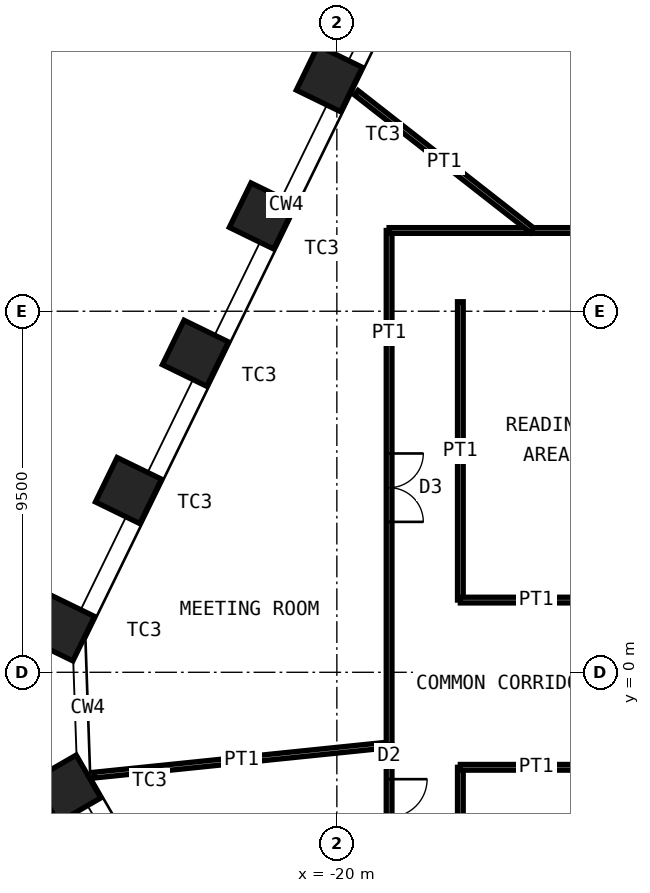
"""IFC4 building model, lengths in metres.
Left out: names, types, materials, properties, quantities, classifications, styles, units other than length and angle.
Written with IfcOpenShell. Run it as: python <this file> out.ifc"""

import sys

from ifc_helpers import new_model, si_unit, direction, frame, frame_2d, origin, origin_2d, place, context, subcontext, project, spatial, rectangle, hollow_rectangle, extrude, element, fill, save


model = new_model("IFC4")
c1 = context("Model", 3, precision=1e-05, world=origin(), true_north=direction((0.0, 1.0)))
c2 = subcontext(c1, "Body", "Model", "MODEL_VIEW")
j1 = project(units=[si_unit("LENGTHUNIT", "METRE"), si_unit("PLANEANGLEUNIT", "RADIAN")], contexts=[c1])
p1 = place(None, origin())
s1 = spatial("IfcSite", under=j1, at=p1, CompositionType="ELEMENT")
p2 = place(p1, origin())
s2 = spatial("IfcBuilding", under=s1, at=p2, CompositionType="ELEMENT")
p3 = place(p2, frame((0.0, 0.0, 115.6)))
s3 = spatial("IfcBuildingStorey", under=s2, at=p3, CompositionType="ELEMENT", Elevation=115.6)
for number, where, z_axis, x_axis in (
    (1, (-27.097, -3.067, 0.0), (0.0, 0.0, 1.0), (0.5, -0.866, 0.0)),
    (2, (-27.245, 1.169, 0.0), (0.0, 0.0, 1.0), (-0.438, -0.899, 0.0)),
    (3, (-25.483, 4.781, 0.0), (0.0, 0.0, 1.0), (-0.438, -0.899, 0.0)),
    (4, (-23.721, 8.394, 0.0), (0.0, 0.0, 1.0), (-0.438, -0.899, 0.0)),
    (5, (-21.959, 12.006, 0.0), (0.0, 0.0, 1.0), (-0.438, -0.899, 0.0)),
    (6, (-20.198, 15.618, 0.0), (0.0, 0.0, 1.0), (-0.438, -0.899, 0.0)),
):
    element("IfcColumn", number, at=place(p3, frame(where, z_axis=z_axis, x_axis=x_axis)), inside=s3, PredefinedType="COLUMN", context=c2, shape_type="SweptSolid", body=[
        extrude(hollow_rectangle(XDim=1.3, YDim=1.3, WallThickness=0.1, at=origin_2d()), origin(), (0.0, 0.0, 1.0), 4.2),
    ])
p4 = place(p3, frame((-15.987, 22.455, 0.0), z_axis=(0.0, 0.0, 1.0), x_axis=(0.579969304452, -0.814638328274, 0.0)))
e7 = element("IfcWall", 7, at=p4, inside=s3, PredefinedType="PARTITIONING", context=c2, shape_type="SweptSolid", body=[
    extrude(rectangle(XDim=13.294, YDim=0.15, at=frame_2d((6.647, 0.0))), origin(), (0.0, 0.0, 1.0), 2.93),
])
p5 = place(p3, frame((-18.625, -4.715, 0.0), z_axis=(0.0, 0.0, 1.0), x_axis=(0.0, 1.0, 0.0)))
e8 = element("IfcWall", 8, at=p5, inside=s3, PredefinedType="PARTITIONING", context=c2, shape_type="SweptSolid", body=[
    extrude(rectangle(XDim=2.805, YDim=0.15, at=frame_2d((1.402, 0.0))), origin(), (0.0, 0.0, 1.0), 4.03),
])
p6 = place(p5, frame((0.902, 0.0, 0.0)))
e9 = element("IfcOpeningElement", 9, at=p6, cuts=e8, PredefinedType="OPENING", context=c2, shape_type="SweptSolid", body=[
    extrude(rectangle(XDim=1.0, YDim=2.4, at=frame_2d((0.5, 1.2))), frame((0.0, 0.085, 0.0), z_axis=(0.0, -1.0, 0.0), x_axis=(1.0, 0.0, 0.0)), (0.0, 0.0, 1.0), 0.17),
])
p7 = place(p3, frame((-26.391, -2.706, 0.0), z_axis=(0.0, 0.0, 1.0), x_axis=(0.994783554373, 0.10200823471, 0.0)))
e10 = element("IfcWall", 10, at=p7, inside=s3, PredefinedType="PARTITIONING", context=c2, shape_type="SweptSolid", body=[
    extrude(rectangle(XDim=7.807, YDim=0.15, at=frame_2d((3.904, 0.0))), origin(), (0.0, 0.0, 1.0), 2.93),
])
p8 = place(p3, frame((-18.625, -1.91, 0.0), z_axis=(0.0, 0.0, 1.0), x_axis=(0.0, 1.0, 0.0)))
e11 = element("IfcWall", 11, at=p8, inside=s3, PredefinedType="PARTITIONING", context=c2, shape_type="SweptSolid", body=[
    extrude(rectangle(XDim=13.535, YDim=0.15, at=frame_2d((6.768, 0.0))), origin(), (0.0, 0.0, 1.0), 4.03),
])
p9 = place(p8, frame((5.867, 0.0, 0.0)))
e12 = element("IfcOpeningElement", 12, at=p9, cuts=e11, PredefinedType="OPENING", context=c2, shape_type="SweptSolid", body=[
    extrude(rectangle(XDim=1.8, YDim=2.4, at=frame_2d((0.9, 1.2))), frame((0.0, 0.085, 0.0), z_axis=(0.0, -1.0, 0.0), x_axis=(1.0, 0.0, 0.0)), (0.0, 0.0, 1.0), 0.17),
])
p10 = place(p3, frame((-18.625, 11.625, 0.0), z_axis=(0.0, 0.0, 1.0), x_axis=(1.0, 0.0, 0.0)))
e13 = element("IfcWall", 13, at=p10, inside=s3, PredefinedType="PARTITIONING", context=c2, shape_type="SweptSolid", body=[
    extrude(rectangle(XDim=3.768, YDim=0.15, at=frame_2d((1.884, 0.0))), origin(), (0.0, 0.0, 1.0), 4.03),
])
p11 = place(p3, frame((-19.49, 15.25, 0.0), z_axis=(0.0, 0.0, 1.0), x_axis=(0.787549668605, -0.616251182133, 0.0)))
e14 = element("IfcWall", 14, at=p11, inside=s3, PredefinedType="PARTITIONING", context=c2, shape_type="SweptSolid", body=[
    extrude(rectangle(XDim=5.882, YDim=0.15, at=frame_2d((2.941, 0.0))), origin(), (0.0, 0.0, 1.0), 3.33),
])
p12 = place(p3, frame((-14.857, 11.625, 0.0), z_axis=(0.0, 0.0, 1.0), x_axis=(1.0, 0.0, 0.0)))
e15 = element("IfcWall", 15, at=p12, inside=s3, PredefinedType="PARTITIONING", context=c2, shape_type="SweptSolid", body=[
    extrude(rectangle(XDim=6.581, YDim=0.15, at=frame_2d((3.29, 0.0))), origin(), (0.0, 0.0, 1.0), 4.03),
])
p13 = place(p12, frame((2.79, 0.0, 0.0)))
e16 = element("IfcOpeningElement", 16, at=p13, cuts=e15, PredefinedType="OPENING", context=c2, shape_type="SweptSolid", body=[
    extrude(rectangle(XDim=1.0, YDim=2.4, at=frame_2d((0.5, 1.2))), frame((0.0, 0.085, 0.0), z_axis=(0.0, -1.0, 0.0), x_axis=(1.0, 0.0, 0.0)), (0.0, 0.0, 1.0), 0.17),
])
p14 = place(p3, frame((-16.75, 1.9, 0.0), z_axis=(0.0, 0.0, 1.0), x_axis=(0.0, 1.0, 0.0)))
e17 = element("IfcWall", 17, at=p14, inside=s3, PredefinedType="PARTITIONING", context=c2, shape_type="SweptSolid", body=[
    extrude(rectangle(XDim=7.85, YDim=0.15, at=frame_2d((3.925, 0.0))), origin(), (0.0, 0.0, 1.0), 4.03),
])
p15 = place(p3, frame((-12.75, 1.9, 0.0), z_axis=(0.0, 0.0, 1.0), x_axis=(-1.0, 0.0, 0.0)))
e18 = element("IfcWall", 18, at=p15, inside=s3, PredefinedType="PARTITIONING", context=c2, shape_type="SweptSolid", body=[
    extrude(rectangle(XDim=4.0, YDim=0.15, at=frame_2d((2.0, 0.0))), origin(), (0.0, 0.0, 1.0), 3.33),
])
p16 = place(p3, frame((-16.75, -9.75, 0.0), z_axis=(0.0, 0.0, 1.0), x_axis=(0.0, 1.0, 0.0)))
e19 = element("IfcWall", 19, at=p16, inside=s3, PredefinedType="PARTITIONING", context=c2, shape_type="SweptSolid", body=[
    extrude(rectangle(XDim=7.25, YDim=0.15, at=frame_2d((3.625, 0.0))), origin(), (0.0, 0.0, 1.0), 4.03),
])
p17 = place(p3, frame((-12.75, -2.5, 0.0), z_axis=(0.0, 0.0, 1.0), x_axis=(-1.0, 0.0, 0.0)))
e20 = element("IfcWall", 20, at=p17, inside=s3, PredefinedType="PARTITIONING", context=c2, shape_type="SweptSolid", body=[
    extrude(rectangle(XDim=4.0, YDim=0.15, at=frame_2d((2.0, 0.0))), origin(), (0.0, 0.0, 1.0), 3.33),
])
p18 = place(p6, origin())
e21 = element("IfcDoor", 21, at=p18, inside=s3, OperationType="SINGLE_SWING_RIGHT", PredefinedType="DOOR", context=c2, shape_type="SweptSolid", body=[
    extrude(rectangle(XDim=1.0, YDim=2.4, at=frame_2d((0.5, 1.2))), frame((0.0, 0.025, 0.0), z_axis=(0.0, -1.0, 0.0), x_axis=(1.0, 0.0, 0.0)), (0.0, 0.0, 1.0), 0.05),
])
fill(e9, e21)
p19 = place(p9, origin())
e22 = element("IfcDoor", 22, at=p19, inside=s3, OperationType="DOUBLE_DOOR_DOUBLE_SWING", PredefinedType="DOOR", context=c2, shape_type="SweptSolid", body=[
    extrude(rectangle(XDim=1.8, YDim=2.4, at=frame_2d((0.9, 1.2))), frame((0.0, 0.025, 0.0), z_axis=(0.0, -1.0, 0.0), x_axis=(1.0, 0.0, 0.0)), (0.0, 0.0, 1.0), 0.05),
])
fill(e12, e22)
save(model, sys.argv[1])
